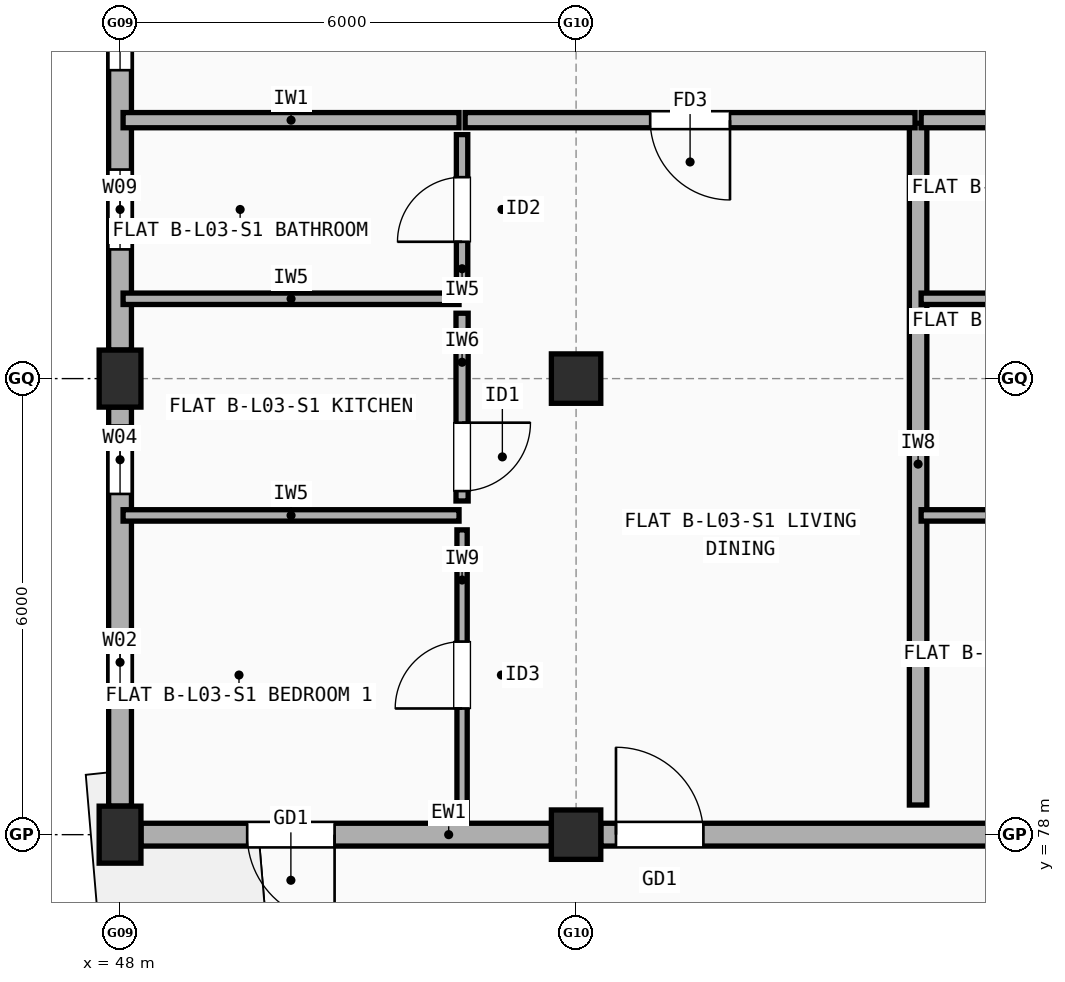
"""IFC4 building model, lengths in metres.
Left out: names, types, materials, properties, quantities, classifications, styles, units other than length and angle.
Written with IfcOpenShell. Run it as: python <this file> out.ifc"""

import sys

from ifc_helpers import new_model, si_unit, direction, frame, frame_2d, origin, origin_2d, place, context, subcontext, project, spatial, rectangle, extrude, element, fill, save


model = new_model("IFC4")
c1 = context("Model", 3, precision=1e-05, world=origin(), true_north=direction((0.0, 1.0)))
c2 = subcontext(c1, "Body", "Model", "MODEL_VIEW")
j1 = project(units=[si_unit("LENGTHUNIT", "METRE"), si_unit("PLANEANGLEUNIT", "RADIAN")], contexts=[c1])
p1 = place(None, origin())
s1 = spatial("IfcSite", under=j1, at=p1, CompositionType="ELEMENT")
p2 = place(p1, origin())
s2 = spatial("IfcBuilding", under=s1, at=p2, CompositionType="ELEMENT")
p3 = place(p2, frame((0.0, 0.0, 10.9)))
s3 = spatial("IfcBuildingStorey", under=s2, at=p3, CompositionType="ELEMENT", Elevation=10.9)
for number, where, z_axis, x_axis in (
    (1, (48.0, 78.0, 0.0), (0.0, 0.0, 1.0), (1.0, 0.0, 0.0)),
    (2, (48.0, 84.0, 0.0), (0.0, 0.0, 1.0), (1.0, 0.0, 0.0)),
):
    element("IfcColumn", number, at=place(p3, frame(where, z_axis=z_axis, x_axis=x_axis)), inside=s3, PredefinedType="COLUMN", context=c2, shape_type="SweptSolid", body=[
        extrude(rectangle(XDim=0.55, YDim=0.75, at=origin_2d()), origin(), (0.0, 0.0, 1.0), 2.96),
    ])
for number, where, z_axis, x_axis in (
    (3, (54.0, 78.0, 0.0), (0.0, 0.0, 1.0), (1.0, 0.0, 0.0)),
    (4, (54.0, 84.0, 0.0), (0.0, 0.0, 1.0), (1.0, 0.0, 0.0)),
):
    element("IfcColumn", number, at=place(p3, frame(where, z_axis=z_axis, x_axis=x_axis)), inside=s3, PredefinedType="COLUMN", context=c2, shape_type="SweptSolid", body=[
        extrude(rectangle(XDim=0.65, YDim=0.65, at=origin_2d()), origin(), (0.0, 0.0, 1.0), 2.96),
    ])
p4 = place(p3, frame((48.275, 78.0, 0.0), z_axis=(0.0, 0.0, 1.0), x_axis=(1.0, 0.0, 0.0)))
e5 = element("IfcWall", 5, at=p4, inside=s3, PredefinedType="STANDARD", context=c2, shape_type="SweptSolid", body=[
    extrude(rectangle(XDim=5.4, YDim=0.3, at=frame_2d((2.7, 0.0))), origin(), (0.0, 0.0, 1.0), 2.442),
])
p5 = place(p4, frame((1.398, 0.0, 0.0)))
e6 = element("IfcOpeningElement", 6, at=p5, cuts=e5, PredefinedType="OPENING", context=c2, shape_type="SweptSolid", body=[
    extrude(rectangle(XDim=1.15, YDim=2.15, at=frame_2d((0.575, 1.075))), frame((0.0, 0.16, 0.0), z_axis=(0.0, -1.0, 0.0), x_axis=(1.0, 0.0, 0.0)), (0.0, 0.0, 1.0), 0.32),
])
p6 = place(p3, frame((54.325, 78.0, 0.0), z_axis=(0.0, 0.0, 1.0), x_axis=(1.0, 0.0, 0.0)))
e7 = element("IfcWall", 7, at=p6, inside=s3, PredefinedType="STANDARD", context=c2, shape_type="SweptSolid", body=[
    extrude(rectangle(XDim=5.35, YDim=0.3, at=frame_2d((2.675, 0.0))), origin(), (0.0, 0.0, 1.0), 2.442),
])
p7 = place(p6, frame((0.2, 0.0, 0.0)))
e8 = element("IfcOpeningElement", 8, at=p7, cuts=e7, PredefinedType="OPENING", context=c2, shape_type="SweptSolid", body=[
    extrude(rectangle(XDim=1.15, YDim=2.15, at=frame_2d((0.575, 1.075))), frame((0.0, 0.16, 0.0), z_axis=(0.0, -1.0, 0.0), x_axis=(1.0, 0.0, 0.0)), (0.0, 0.0, 1.0), 0.32),
])
p8 = place(p3, frame((48.0, 89.625, 0.0), z_axis=(0.0, 0.0, 1.0), x_axis=(0.0, -1.0, 0.0)))
e9 = element("IfcWall", 9, at=p8, inside=s3, PredefinedType="STANDARD", context=c2, shape_type="SweptSolid", body=[
    extrude(rectangle(XDim=5.25, YDim=0.3, at=frame_2d((2.625, 0.0))), origin(), (0.0, 0.0, 1.0), 2.442),
])
p9 = place(p8, frame((0.617, 0.0, 0.9)))
e10 = element("IfcOpeningElement", 10, at=p9, cuts=e9, PredefinedType="OPENING", context=c2, shape_type="SweptSolid", body=[
    extrude(rectangle(XDim=0.95, YDim=1.35, at=frame_2d((0.475, 0.675))), frame((0.0, 0.16, 0.0), z_axis=(0.0, -1.0, 0.0), x_axis=(1.0, 0.0, 0.0)), (0.0, 0.0, 1.0), 0.32),
])
p10 = place(p8, frame((2.875, 0.0, 0.9)))
e11 = element("IfcOpeningElement", 11, at=p10, cuts=e9, PredefinedType="OPENING", context=c2, shape_type="SweptSolid", body=[
    extrude(rectangle(XDim=1.05, YDim=1.35, at=frame_2d((0.525, 0.675))), frame((0.0, 0.16, 0.0), z_axis=(0.0, -1.0, 0.0), x_axis=(1.0, 0.0, 0.0)), (0.0, 0.0, 1.0), 0.32),
])
p11 = place(p3, frame((48.0, 83.625, 0.0), z_axis=(0.0, 0.0, 1.0), x_axis=(0.0, -1.0, 0.0)))
e12 = element("IfcWall", 12, at=p11, inside=s3, PredefinedType="STANDARD", context=c2, shape_type="SweptSolid", body=[
    extrude(rectangle(XDim=5.25, YDim=0.3, at=frame_2d((2.625, 0.0))), origin(), (0.0, 0.0, 1.0), 2.442),
])
p12 = place(p11, frame((0.242, 0.0, 0.9)))
e13 = element("IfcOpeningElement", 13, at=p12, cuts=e12, PredefinedType="OPENING", context=c2, shape_type="SweptSolid", body=[
    extrude(rectangle(XDim=0.9, YDim=1.3, at=frame_2d((0.45, 0.65))), frame((0.0, 0.16, 0.0), z_axis=(0.0, -1.0, 0.0), x_axis=(1.0, 0.0, 0.0)), (0.0, 0.0, 1.0), 0.32),
])
p13 = place(p11, frame((2.958, 0.0, 0.9)))
e14 = element("IfcOpeningElement", 14, at=p13, cuts=e12, PredefinedType="OPENING", context=c2, shape_type="SweptSolid", body=[
    extrude(rectangle(XDim=0.8, YDim=1.2, at=frame_2d((0.4, 0.6))), frame((0.0, 0.16, 0.0), z_axis=(0.0, -1.0, 0.0), x_axis=(1.0, 0.0, 0.0)), (0.0, 0.0, 1.0), 0.32),
])
p14 = place(p3, frame((58.5, 78.39, 0.0), z_axis=(0.0, 0.0, 1.0), x_axis=(0.0, 1.0, 0.0)))
e15 = element("IfcWall", 15, at=p14, inside=s3, PredefinedType="SOLIDWALL", context=c2, shape_type="SweptSolid", body=[
    extrude(rectangle(XDim=8.97, YDim=0.23, at=frame_2d((4.485, 0.0))), origin(), (0.0, 0.0, 1.0), 2.442),
])
p15 = place(p3, frame((48.04, 87.4, 0.0), z_axis=(0.0, 0.0, 1.0), x_axis=(1.0, 0.0, 0.0)))
e16 = element("IfcWall", 16, at=p15, inside=s3, PredefinedType="SOLIDWALL", context=c2, shape_type="SweptSolid", body=[
    extrude(rectangle(XDim=4.42, YDim=0.2, at=frame_2d((2.21, 0.0))), origin(), (0.0, 0.0, 1.0), 2.442),
])
p16 = place(p3, frame((52.54, 87.4, 0.0), z_axis=(0.0, 0.0, 1.0), x_axis=(1.0, 0.0, 0.0)))
e17 = element("IfcWall", 17, at=p16, inside=s3, PredefinedType="SOLIDWALL", context=c2, shape_type="SweptSolid", body=[
    extrude(rectangle(XDim=5.92, YDim=0.2, at=frame_2d((2.96, 0.0))), origin(), (0.0, 0.0, 1.0), 2.548),
])
p17 = place(p16, frame((2.435, 0.0, 0.0)))
e18 = element("IfcOpeningElement", 18, at=p17, cuts=e17, PredefinedType="OPENING", context=c2, shape_type="SweptSolid", body=[
    extrude(rectangle(XDim=1.05, YDim=2.15, at=frame_2d((0.525, 1.075))), frame((0.0, 0.11, 0.0), z_axis=(0.0, -1.0, 0.0), x_axis=(1.0, 0.0, 0.0)), (0.0, 0.0, 1.0), 0.22),
])
p18 = place(p3, frame((52.5, 78.19, 0.0), z_axis=(0.0, 0.0, 1.0), x_axis=(0.0, 1.0, 0.0)))
e19 = element("IfcWall", 19, at=p18, inside=s3, PredefinedType="PARTITIONING", context=c2, shape_type="SweptSolid", body=[
    extrude(rectangle(XDim=3.82, YDim=0.135, at=frame_2d((1.91, 0.0))), origin(), (0.0, 0.0, 1.0), 2.96),
])
p19 = place(p18, frame((1.47, 0.0, 0.0)))
e20 = element("IfcOpeningElement", 20, at=p19, cuts=e19, PredefinedType="OPENING", context=c2, shape_type="SweptSolid", body=[
    extrude(rectangle(XDim=0.88, YDim=2.1, at=frame_2d((0.44, 1.05))), frame((0.0, 0.077, 0.0), z_axis=(0.0, -1.0, 0.0), x_axis=(1.0, 0.0, 0.0)), (0.0, 0.0, 1.0), 0.155),
])
p20 = place(p3, frame((52.5, 82.39, 0.0), z_axis=(0.0, 0.0, 1.0), x_axis=(0.0, 1.0, 0.0)))
e21 = element("IfcWall", 21, at=p20, inside=s3, PredefinedType="PLUMBINGWALL", context=c2, shape_type="SweptSolid", body=[
    extrude(rectangle(XDim=2.47, YDim=0.16, at=frame_2d((1.235, 0.0))), origin(), (0.0, 0.0, 1.0), 2.442),
])
p21 = place(p20, frame((0.13, 0.0, 0.0)))
e22 = element("IfcOpeningElement", 22, at=p21, cuts=e21, PredefinedType="OPENING", context=c2, shape_type="SweptSolid", body=[
    extrude(rectangle(XDim=0.9, YDim=2.1, at=frame_2d((0.45, 1.05))), frame((0.0, 0.09, 0.0), z_axis=(0.0, -1.0, 0.0), x_axis=(1.0, 0.0, 0.0)), (0.0, 0.0, 1.0), 0.18),
])
p22 = place(p3, frame((52.5, 85.24, 0.0), z_axis=(0.0, 0.0, 1.0), x_axis=(0.0, 1.0, 0.0)))
e23 = element("IfcWall", 23, at=p22, inside=s3, PredefinedType="PARTITIONING", context=c2, shape_type="SweptSolid", body=[
    extrude(rectangle(XDim=1.97, YDim=0.15, at=frame_2d((0.985, 0.0))), origin(), (0.0, 0.0, 1.0), 2.96),
])
p23 = place(p22, frame((0.56, 0.0, 0.0)))
e24 = element("IfcOpeningElement", 24, at=p23, cuts=e23, PredefinedType="OPENING", context=c2, shape_type="SweptSolid", body=[
    extrude(rectangle(XDim=0.85, YDim=2.1, at=frame_2d((0.425, 1.05))), frame((0.0, 0.085, 0.0), z_axis=(0.0, -1.0, 0.0), x_axis=(1.0, 0.0, 0.0)), (0.0, 0.0, 1.0), 0.17),
])
for number, where, z_axis, x_axis in (
    (25, (48.04, 82.2, 0.0), (0.0, 0.0, 1.0), (1.0, 0.0, 0.0)),
    (26, (48.04, 85.05, 0.0), (0.0, 0.0, 1.0), (1.0, 0.0, 0.0)),
):
    element("IfcWall", number, at=place(p3, frame(where, z_axis=z_axis, x_axis=x_axis)), inside=s3, PredefinedType="PARTITIONING", context=c2, shape_type="SweptSolid", body=[
        extrude(rectangle(XDim=4.42, YDim=0.15, at=frame_2d((2.21, 0.0))), origin(), (0.0, 0.0, 1.0), 2.442),
    ])
p24 = place(p3, frame((58.54, 87.4, 0.0), z_axis=(0.0, 0.0, 1.0), x_axis=(1.0, 0.0, 0.0)))
e27 = element("IfcWall", 27, at=p24, inside=s3, PredefinedType="SOLIDWALL", context=c2, shape_type="SweptSolid", body=[
    extrude(rectangle(XDim=4.42, YDim=0.2, at=frame_2d((2.21, 0.0))), origin(), (0.0, 0.0, 1.0), 2.508),
])
p25 = place(p3, frame((58.54, 82.2, 0.0), z_axis=(0.0, 0.0, 1.0), x_axis=(1.0, 0.0, 0.0)))
e28 = element("IfcWall", 28, at=p25, inside=s3, PredefinedType="PARTITIONING", context=c2, shape_type="SweptSolid", body=[
    extrude(rectangle(XDim=4.42, YDim=0.15, at=frame_2d((2.21, 0.0))), origin(), (0.0, 0.0, 1.0), 2.548),
])
p26 = place(p3, frame((58.54, 85.05, 0.0), z_axis=(0.0, 0.0, 1.0), x_axis=(1.0, 0.0, 0.0)))
e29 = element("IfcWall", 29, at=p26, inside=s3, PredefinedType="PARTITIONING", context=c2, shape_type="SweptSolid", body=[
    extrude(rectangle(XDim=4.42, YDim=0.15, at=frame_2d((2.21, 0.0))), origin(), (0.0, 0.0, 1.0), 2.508),
])
p27 = place(p5, frame((1.15, 0.0, 0.0), z_axis=(0.0, 0.0, 1.0), x_axis=(-1.0, 0.0, 0.0)))
e30 = element("IfcDoor", 30, at=p27, inside=s3, OperationType="SINGLE_SWING_RIGHT", PredefinedType="DOOR", context=c2, shape_type="SweptSolid", body=[
    extrude(rectangle(XDim=1.15, YDim=2.15, at=frame_2d((0.575, 1.075))), frame((0.0, 0.025, 0.0), z_axis=(0.0, -1.0, 0.0), x_axis=(1.0, 0.0, 0.0)), (0.0, 0.0, 1.0), 0.05),
])
fill(e6, e30)
p28 = place(p7, frame((1.15, 0.0, 0.0), z_axis=(0.0, 0.0, 1.0), x_axis=(-1.0, 0.0, 0.0)))
e31 = element("IfcDoor", 31, at=p28, inside=s3, OperationType="SINGLE_SWING_LEFT", PredefinedType="DOOR", context=c2, shape_type="SweptSolid", body=[
    extrude(rectangle(XDim=1.15, YDim=2.15, at=frame_2d((0.575, 1.075))), frame((0.0, 0.025, 0.0), z_axis=(0.0, -1.0, 0.0), x_axis=(1.0, 0.0, 0.0)), (0.0, 0.0, 1.0), 0.05),
])
fill(e8, e31)
p29 = place(p9, origin())
e32 = element("IfcWindow", 32, at=p29, inside=s3, PartitioningType="SINGLE_PANEL", PredefinedType="WINDOW", context=c2, shape_type="SweptSolid", body=[
    extrude(rectangle(XDim=0.95, YDim=1.35, at=frame_2d((0.475, 0.675))), frame((0.0, 0.03, 0.0), z_axis=(0.0, -1.0, 0.0), x_axis=(1.0, 0.0, 0.0)), (0.0, 0.0, 1.0), 0.06),
])
fill(e10, e32)
p30 = place(p10, origin())
e33 = element("IfcWindow", 33, at=p30, inside=s3, PartitioningType="SINGLE_PANEL", PredefinedType="WINDOW", context=c2, shape_type="SweptSolid", body=[
    extrude(rectangle(XDim=1.05, YDim=1.35, at=frame_2d((0.525, 0.675))), frame((0.0, 0.03, 0.0), z_axis=(0.0, -1.0, 0.0), x_axis=(1.0, 0.0, 0.0)), (0.0, 0.0, 1.0), 0.06),
])
fill(e11, e33)
p31 = place(p12, origin())
e34 = element("IfcWindow", 34, at=p31, inside=s3, PartitioningType="SINGLE_PANEL", PredefinedType="WINDOW", context=c2, shape_type="SweptSolid", body=[
    extrude(rectangle(XDim=0.9, YDim=1.3, at=frame_2d((0.45, 0.65))), frame((0.0, 0.03, 0.0), z_axis=(0.0, -1.0, 0.0), x_axis=(1.0, 0.0, 0.0)), (0.0, 0.0, 1.0), 0.06),
])
fill(e13, e34)
p32 = place(p13, origin())
e35 = element("IfcWindow", 35, at=p32, inside=s3, PartitioningType="SINGLE_PANEL", PredefinedType="WINDOW", context=c2, shape_type="SweptSolid", body=[
    extrude(rectangle(XDim=0.8, YDim=1.2, at=frame_2d((0.4, 0.6))), frame((0.0, 0.03, 0.0), z_axis=(0.0, -1.0, 0.0), x_axis=(1.0, 0.0, 0.0)), (0.0, 0.0, 1.0), 0.06),
])
fill(e14, e35)
p33 = place(p17, origin())
e36 = element("IfcDoor", 36, at=p33, inside=s3, OperationType="SINGLE_SWING_RIGHT", PredefinedType="DOOR", context=c2, shape_type="SweptSolid", body=[
    extrude(rectangle(XDim=1.05, YDim=2.15, at=frame_2d((0.525, 1.075))), frame((0.0, 0.025, 0.0), z_axis=(0.0, -1.0, 0.0), x_axis=(1.0, 0.0, 0.0)), (0.0, 0.0, 1.0), 0.05),
])
fill(e18, e36)
p34 = place(p19, origin())
e37 = element("IfcDoor", 37, at=p34, inside=s3, OperationType="SINGLE_SWING_LEFT", PredefinedType="DOOR", context=c2, shape_type="SweptSolid", body=[
    extrude(rectangle(XDim=0.88, YDim=2.1, at=frame_2d((0.44, 1.05))), frame((0.0, 0.025, 0.0), z_axis=(0.0, -1.0, 0.0), x_axis=(1.0, 0.0, 0.0)), (0.0, 0.0, 1.0), 0.05),
])
fill(e20, e37)
p35 = place(p21, origin())
e38 = element("IfcDoor", 38, at=p35, inside=s3, OperationType="SINGLE_SWING_RIGHT", PredefinedType="DOOR", context=c2, shape_type="SweptSolid", body=[
    extrude(rectangle(XDim=0.9, YDim=2.1, at=frame_2d((0.45, 1.05))), frame((0.0, 0.025, 0.0), z_axis=(0.0, -1.0, 0.0), x_axis=(1.0, 0.0, 0.0)), (0.0, 0.0, 1.0), 0.05),
])
fill(e22, e38)
p36 = place(p23, origin())
e39 = element("IfcDoor", 39, at=p36, inside=s3, OperationType="SINGLE_SWING_LEFT", PredefinedType="DOOR", context=c2, shape_type="SweptSolid", body=[
    extrude(rectangle(XDim=0.85, YDim=2.1, at=frame_2d((0.425, 1.05))), frame((0.0, 0.025, 0.0), z_axis=(0.0, -1.0, 0.0), x_axis=(1.0, 0.0, 0.0)), (0.0, 0.0, 1.0), 0.05),
])
fill(e24, e39)
save(model, sys.argv[1])
